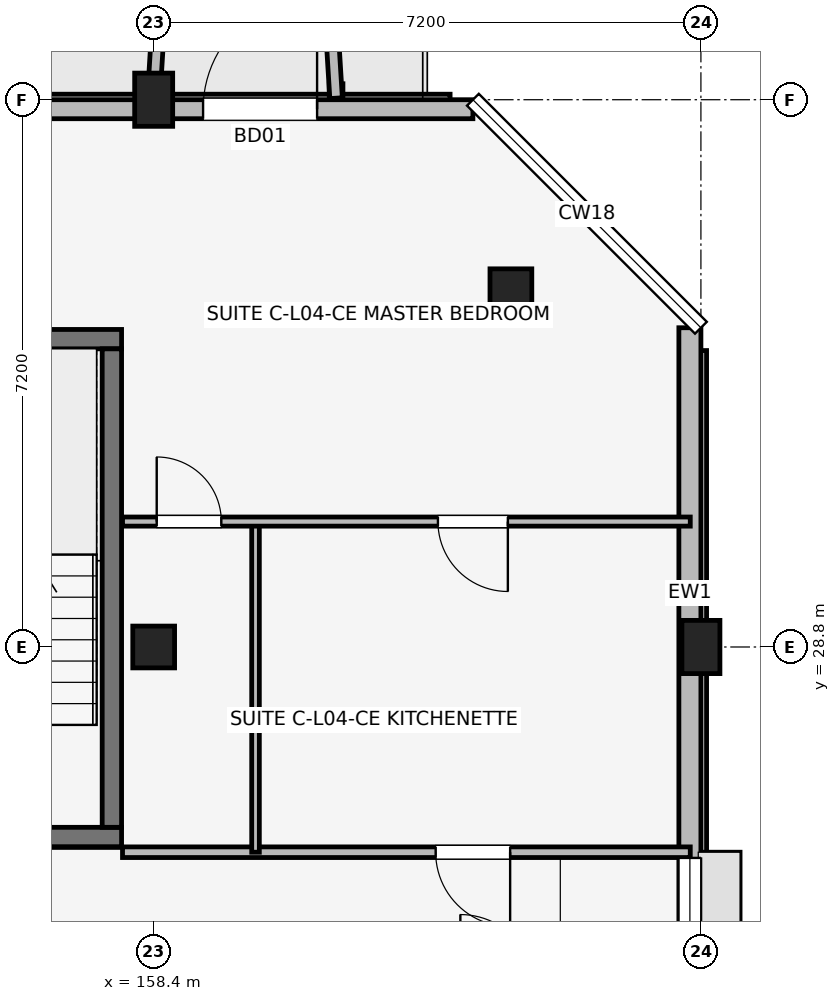
"""IFC4 building model, lengths in metres.
Left out: names, types, materials, properties, quantities, classifications, styles, units other than length and angle.
Written with IfcOpenShell. Run it as: python <this file> out.ifc"""

import sys

from ifc_helpers import new_model, si_unit, direction, frame, frame_2d, origin, origin_2d, place, context, subcontext, project, spatial, rectangle, extrude, element, fill, save


model = new_model("IFC4")
c1 = context("Model", 3, precision=1e-05, world=origin(), true_north=direction((0.0, 1.0)))
c2 = subcontext(c1, "Body", "Model", "MODEL_VIEW")
j1 = project(units=[si_unit("LENGTHUNIT", "METRE"), si_unit("PLANEANGLEUNIT", "RADIAN")], contexts=[c1])
p1 = place(None, origin())
s1 = spatial("IfcSite", under=j1, at=p1, CompositionType="ELEMENT")
p2 = place(p1, origin())
s2 = spatial("IfcBuilding", under=s1, at=p2, CompositionType="ELEMENT")
p3 = place(p2, frame((0.0, 0.0, 15.0)))
s3 = spatial("IfcBuildingStorey", under=s2, at=p3, CompositionType="ELEMENT", Elevation=15.0)
p4 = place(p3, frame((158.4, 28.8, 0.0), z_axis=(0.0, 0.0, 1.0), x_axis=(1.0, 0.0, 0.0)))
e1 = element("IfcColumn", 1, at=p4, inside=s3, PredefinedType="COLUMN", context=c2, shape_type="SweptSolid", body=[
    extrude(rectangle(XDim=0.55, YDim=0.55, at=origin_2d()), origin(), (0.0, 0.0, 1.0), 3.15),
])
for number, where, z_axis, x_axis in (
    (2, (158.4, 36.0, 0.0), (0.0, 0.0, 1.0), (1.0, 0.0, 0.0)),
    (3, (165.6, 28.8, 0.0), (0.0, 0.0, 1.0), (1.0, 0.0, 0.0)),
):
    element("IfcColumn", number, at=place(p3, frame(where, z_axis=z_axis, x_axis=x_axis)), inside=s3, PredefinedType="COLUMN", context=c2, shape_type="SweptSolid", body=[
        extrude(rectangle(XDim=0.5, YDim=0.7, at=origin_2d()), origin(), (0.0, 0.0, 1.0), 3.15),
    ])
p5 = place(p3, frame((163.1, 33.5, 0.0), z_axis=(0.0, 0.0, 1.0), x_axis=(1.0, 0.0, 0.0)))
e4 = element("IfcColumn", 4, at=p5, inside=s3, PredefinedType="COLUMN", context=c2, shape_type="SweptSolid", body=[
    extrude(rectangle(XDim=0.55, YDim=0.55, at=origin_2d()), origin(), (0.0, 0.0, 1.0), 3.15),
])
p6 = place(p3, frame((154.673, 26.3, 0.0), z_axis=(0.0, 0.0, 1.0), x_axis=(1.0, 0.0, 0.0)))
e5 = element("IfcWall", 5, at=p6, inside=s3, PredefinedType="SHEAR", context=c2, shape_type="SweptSolid", body=[
    extrude(rectangle(XDim=3.305, YDim=0.255, at=frame_2d((1.652, 0.0))), origin(), (0.0, 0.0, 1.0), 3.15),
])
p7 = place(p6, frame((1.127, 0.0, 0.0)))
e6 = element("IfcOpeningElement", 6, at=p7, cuts=e5, PredefinedType="OPENING", context=c2, shape_type="SweptSolid", body=[
    extrude(rectangle(XDim=1.05, YDim=2.12, at=frame_2d((0.525, 1.06))), frame((0.0, 0.137, 0.0), z_axis=(0.0, -1.0, 0.0), x_axis=(1.0, 0.0, 0.0)), (0.0, 0.0, 1.0), 0.275),
])
p8 = place(p3, frame((154.673, 32.85, 0.0), z_axis=(0.0, 0.0, 1.0), x_axis=(1.0, 0.0, 0.0)))
e7 = element("IfcWall", 7, at=p8, inside=s3, PredefinedType="SHEAR", context=c2, shape_type="SweptSolid", body=[
    extrude(rectangle(XDim=3.305, YDim=0.255, at=frame_2d((1.652, 0.0))), origin(), (0.0, 0.0, 1.0), 3.15),
])
p9 = place(p3, frame((157.85, 26.427, 0.0), z_axis=(0.0, 0.0, 1.0), x_axis=(0.0, 1.0, 0.0)))
e8 = element("IfcWall", 8, at=p9, inside=s3, PredefinedType="SHEAR", context=c2, shape_type="SweptSolid", body=[
    extrude(rectangle(XDim=6.295, YDim=0.255, at=frame_2d((3.147, 0.0))), origin(), (0.0, 0.0, 1.0), 3.15),
])
p10 = place(p3, frame((165.455, 17.4, 0.0), z_axis=(0.0, 0.0, 1.0), x_axis=(0.0, 1.0, 0.0)))
e9 = element("IfcWall", 9, at=p10, inside=s3, PredefinedType="SOLIDWALL", context=c2, shape_type="SweptSolid", body=[
    extrude(rectangle(XDim=15.6, YDim=0.29, at=frame_2d((7.8, 0.0))), origin(), (0.0, 0.0, 1.0), 2.38),
])
p11 = place(p10, frame((6.975, 0.0, 1.05)))
e10 = element("IfcOpeningElement", 10, at=p11, cuts=e9, PredefinedType="OPENING", context=c2, shape_type="SweptSolid", body=[
    extrude(rectangle(XDim=1.65, YDim=1.15, at=frame_2d((0.825, 0.575))), frame((0.0, 0.155, 0.0), z_axis=(0.0, -1.0, 0.0), x_axis=(1.0, 0.0, 0.0)), (0.0, 0.0, 1.0), 0.31),
])
p12 = place(p10, frame((1.255, 0.0, 0.67)))
e11 = element("IfcOpeningElement", 11, at=p12, cuts=e9, PredefinedType="OPENING", context=c2, shape_type="SweptSolid", body=[
    extrude(rectangle(XDim=1.42, YDim=1.6, at=frame_2d((0.71, 0.8))), frame((0.0, 0.155, 0.0), z_axis=(0.0, -1.0, 0.0), x_axis=(1.0, 0.0, 0.0)), (0.0, 0.0, 1.0), 0.31),
])
p13 = place(p3, frame((162.6, 35.875, 0.0), z_axis=(0.0, 0.0, 1.0), x_axis=(-1.0, 0.0, 0.0)))
e12 = element("IfcWall", 12, at=p13, inside=s3, PredefinedType="SOLIDWALL", context=c2, shape_type="SweptSolid", body=[
    extrude(rectangle(XDim=30.0, YDim=0.25, at=frame_2d((15.0, 0.0))), origin(), (0.0, 0.0, 1.0), 2.43),
])
p14 = place(p13, frame((27.95, 0.0, 0.0), z_axis=(0.0, 0.0, 1.0), x_axis=(-1.0, 0.0, 0.0)))
e13 = element("IfcOpeningElement", 13, at=p14, cuts=e12, PredefinedType="OPENING", context=c2, shape_type="SweptSolid", body=[
    extrude(rectangle(XDim=1.5, YDim=2.15, at=frame_2d((0.75, 1.075))), frame((0.0, 0.135, 0.0), z_axis=(0.0, -1.0, 0.0), x_axis=(1.0, 0.0, 0.0)), (0.0, 0.0, 1.0), 0.27),
])
p15 = place(p13, frame((3.55, 0.0, 0.0), z_axis=(0.0, 0.0, 1.0), x_axis=(-1.0, 0.0, 0.0)))
e14 = element("IfcOpeningElement", 14, at=p15, cuts=e12, PredefinedType="OPENING", context=c2, shape_type="SweptSolid", body=[
    extrude(rectangle(XDim=1.5, YDim=2.15, at=frame_2d((0.75, 1.075))), frame((0.0, 0.135, 0.0), z_axis=(0.0, -1.0, 0.0), x_axis=(1.0, 0.0, 0.0)), (0.0, 0.0, 1.0), 0.27),
])
p16 = place(p13, frame((14.55, 0.0, 0.5)))
e15 = element("IfcOpeningElement", 15, at=p16, cuts=e12, PredefinedType="OPENING", context=c2, shape_type="SweptSolid", body=[
    extrude(rectangle(XDim=0.9, YDim=1.8, at=frame_2d((0.45, 0.9))), frame((0.0, 0.135, 0.0), z_axis=(0.0, -1.0, 0.0), x_axis=(1.0, 0.0, 0.0)), (0.0, 0.0, 1.0), 0.27),
])
p17 = place(p13, frame((9.125, 0.0, 0.7)))
e16 = element("IfcOpeningElement", 16, at=p17, cuts=e12, PredefinedType="OPENING", context=c2, shape_type="SweptSolid", body=[
    extrude(rectangle(XDim=1.86, YDim=1.6, at=frame_2d((0.93, 0.8))), frame((0.0, 0.135, 0.0), z_axis=(0.0, -1.0, 0.0), x_axis=(1.0, 0.0, 0.0)), (0.0, 0.0, 1.0), 0.27),
])
p18 = place(p13, frame((19.155, 0.0, 0.7)))
e17 = element("IfcOpeningElement", 17, at=p18, cuts=e12, PredefinedType="OPENING", context=c2, shape_type="SweptSolid", body=[
    extrude(rectangle(XDim=1.58, YDim=1.6, at=frame_2d((0.79, 0.8))), frame((0.0, 0.135, 0.0), z_axis=(0.0, -1.0, 0.0), x_axis=(1.0, 0.0, 0.0)), (0.0, 0.0, 1.0), 0.27),
])
for number, where, z_axis, x_axis in (
    (18, (158.4, 36.02, 0.0), (0.0, 0.0, 1.0), (0.061, 0.998, 0.0)),
    (19, (160.8, 36.02, 0.0), (0.0, 0.0, 1.0), (-0.061, 0.998, 0.0)),
):
    element("IfcWall", number, at=place(p3, frame(where, z_axis=z_axis, x_axis=x_axis)), inside=s3, PredefinedType="ELEMENTEDWALL", context=c2, shape_type="SweptSolid", body=[
        extrude(rectangle(XDim=1.964, YDim=0.165, at=frame_2d((0.982, 0.0))), origin(), (0.0, 0.0, 1.0), 2.95),
    ])
p19 = place(p3, frame((157.99, 26.1, 0.0), z_axis=(0.0, 0.0, 1.0), x_axis=(1.0, 0.0, 0.0)))
e20 = element("IfcWall", 20, at=p19, inside=s3, PredefinedType="PARTITIONING", context=c2, shape_type="SweptSolid", body=[
    extrude(rectangle(XDim=7.47, YDim=0.14, at=frame_2d((3.735, 0.0))), origin(), (0.0, 0.0, 1.0), 2.38),
])
p20 = place(p19, frame((5.1, 0.0, 0.0), z_axis=(0.0, 0.0, 1.0), x_axis=(-1.0, 0.0, 0.0)))
e21 = element("IfcOpeningElement", 21, at=p20, cuts=e20, PredefinedType="OPENING", context=c2, shape_type="SweptSolid", body=[
    extrude(rectangle(XDim=0.98, YDim=2.1, at=frame_2d((0.49, 1.05))), frame((0.0, 0.08, 0.0), z_axis=(0.0, -1.0, 0.0), x_axis=(1.0, 0.0, 0.0)), (0.0, 0.0, 1.0), 0.16),
])
p21 = place(p3, frame((159.74, 26.1, 0.0), z_axis=(0.0, 0.0, 1.0), x_axis=(0.0, 1.0, 0.0)))
e22 = element("IfcWall", 22, at=p21, inside=s3, PredefinedType="PARTITIONING", context=c2, shape_type="SweptSolid", body=[
    extrude(rectangle(XDim=4.35, YDim=0.1, at=frame_2d((2.175, 0.0))), origin(), (0.0, 0.0, 1.0), 2.375),
])
p22 = place(p3, frame((157.99, 30.45, 0.0), z_axis=(0.0, 0.0, 1.0), x_axis=(1.0, 0.0, 0.0)))
e23 = element("IfcWall", 23, at=p22, inside=s3, PredefinedType="PARTITIONING", context=c2, shape_type="SweptSolid", body=[
    extrude(rectangle(XDim=7.47, YDim=0.12, at=frame_2d((3.735, 0.0))), origin(), (0.0, 0.0, 1.0), 2.38),
])
p23 = place(p22, frame((0.45, 0.0, 0.0)))
e24 = element("IfcOpeningElement", 24, at=p23, cuts=e23, PredefinedType="OPENING", context=c2, shape_type="SweptSolid", body=[
    extrude(rectangle(XDim=0.85, YDim=2.08, at=frame_2d((0.425, 1.04))), frame((0.0, 0.07, 0.0), z_axis=(0.0, -1.0, 0.0), x_axis=(1.0, 0.0, 0.0)), (0.0, 0.0, 1.0), 0.14),
])
p24 = place(p22, frame((5.07, 0.0, 0.0), z_axis=(0.0, 0.0, 1.0), x_axis=(-1.0, 0.0, 0.0)))
e25 = element("IfcOpeningElement", 25, at=p24, cuts=e23, PredefinedType="OPENING", context=c2, shape_type="SweptSolid", body=[
    extrude(rectangle(XDim=0.92, YDim=2.08, at=frame_2d((0.46, 1.04))), frame((0.0, 0.07, 0.0), z_axis=(0.0, -1.0, 0.0), x_axis=(1.0, 0.0, 0.0)), (0.0, 0.0, 1.0), 0.14),
])
p25 = place(p15, origin())
e26 = element("IfcDoor", 26, at=p25, inside=s3, OperationType="SINGLE_SWING_LEFT", PredefinedType="DOOR", context=c2, shape_type="SweptSolid", body=[
    extrude(rectangle(XDim=1.5, YDim=2.15, at=frame_2d((0.75, 1.075))), frame((0.0, 0.025, 0.0), z_axis=(0.0, -1.0, 0.0), x_axis=(1.0, 0.0, 0.0)), (0.0, 0.0, 1.0), 0.05),
])
fill(e14, e26)
p26 = place(p11, origin())
e27 = element("IfcWindow", 27, at=p26, inside=s3, PartitioningType="SINGLE_PANEL", PredefinedType="WINDOW", context=c2, shape_type="SweptSolid", body=[
    extrude(rectangle(XDim=1.65, YDim=1.15, at=frame_2d((0.825, 0.575))), frame((0.0, 0.03, 0.0), z_axis=(0.0, -1.0, 0.0), x_axis=(1.0, 0.0, 0.0)), (0.0, 0.0, 1.0), 0.06),
])
fill(e10, e27)
p27 = place(p20, origin())
e28 = element("IfcDoor", 28, at=p27, inside=s3, OperationType="SINGLE_SWING_RIGHT", PredefinedType="DOOR", context=c2, shape_type="SweptSolid", body=[
    extrude(rectangle(XDim=0.98, YDim=2.1, at=frame_2d((0.49, 1.05))), frame((0.0, 0.025, 0.0), z_axis=(0.0, -1.0, 0.0), x_axis=(1.0, 0.0, 0.0)), (0.0, 0.0, 1.0), 0.05),
])
fill(e21, e28)
p28 = place(p23, origin())
e29 = element("IfcDoor", 29, at=p28, inside=s3, OperationType="SINGLE_SWING_LEFT", PredefinedType="DOOR", context=c2, shape_type="SweptSolid", body=[
    extrude(rectangle(XDim=0.85, YDim=2.08, at=frame_2d((0.425, 1.04))), frame((0.0, 0.025, 0.0), z_axis=(0.0, -1.0, 0.0), x_axis=(1.0, 0.0, 0.0)), (0.0, 0.0, 1.0), 0.05),
])
fill(e24, e29)
p29 = place(p24, origin())
e30 = element("IfcDoor", 30, at=p29, inside=s3, OperationType="SINGLE_SWING_RIGHT", PredefinedType="DOOR", context=c2, shape_type="SweptSolid", body=[
    extrude(rectangle(XDim=0.92, YDim=2.08, at=frame_2d((0.46, 1.04))), frame((0.0, 0.025, 0.0), z_axis=(0.0, -1.0, 0.0), x_axis=(1.0, 0.0, 0.0)), (0.0, 0.0, 1.0), 0.05),
])
fill(e25, e30)
save(model, sys.argv[1])
